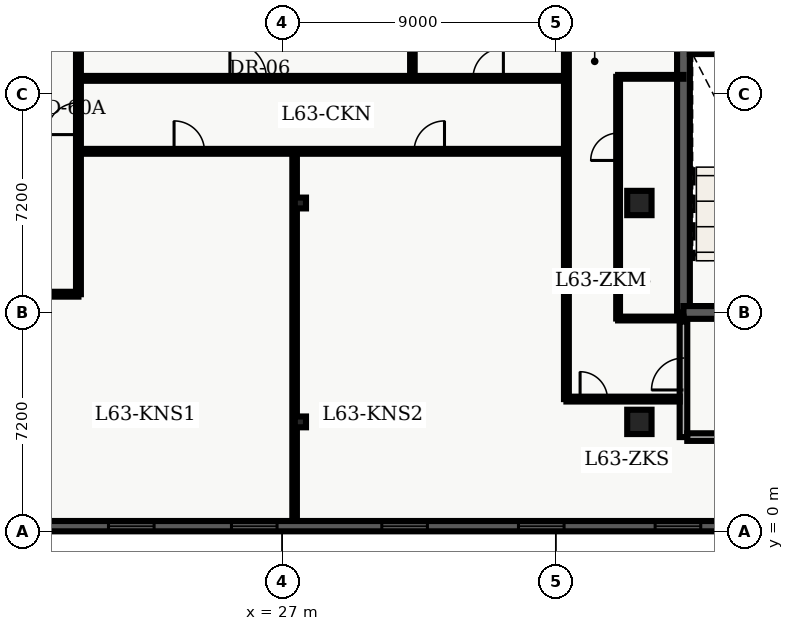
"""IFC4 building model, lengths in metres.
Left out: names, types, materials, properties, quantities, classifications, styles, units other than length and angle.
Written with IfcOpenShell. Run it as: python <this file> out.ifc"""

import sys

from ifc_helpers import new_model, entity, si_unit, converted_unit, direction, frame, origin_with_axes, origin_2d_with_axis, place, context, subcontext, project, spatial, polyline, rectangle, i_section, outline, extrude, element, fill, save


model = new_model("IFC4")
c1 = context("Model", 3, precision=1e-05, world=origin_with_axes(), true_north=direction((0.0, 1.0)))
c2 = subcontext(c1, "Body", "Model", "MODEL_VIEW")
j1 = project(units=[si_unit("LENGTHUNIT", "METRE"), converted_unit("PLANEANGLEUNIT", "DEGREE", entity("IfcPlaneAngleMeasure", 0.017), si_unit("PLANEANGLEUNIT", "RADIAN"), dimensions=[0, 0, 0, 0, 0, 0, 0])], contexts=[c1])
p1 = place(None, origin_with_axes())
s1 = spatial("IfcSite", under=j1, at=p1, CompositionType="ELEMENT")
p2 = place(p1, origin_with_axes())
s2 = spatial("IfcBuilding", under=s1, at=p2, CompositionType="ELEMENT")
p3 = place(p2, frame((0.0, 0.0, 256.8), z_axis=(0.0, 0.0, 1.0), x_axis=(1.0, 0.0, 0.0)))
s3 = spatial("IfcBuildingStorey", under=s2, at=p3, CompositionType="ELEMENT", Elevation=256.8)
p4 = place(p3, frame((40.2, 7.2, 0.0), z_axis=(0.0, 0.0, 1.0), x_axis=(0.0, 1.0, 0.0)))
e1 = element("IfcWall", 1, at=p4, inside=s3, PredefinedType="SHEAR", context=c2, shape_type="SweptSolid", body=[
    extrude(outline(polyline([(0.0, -0.21), (15.6, -0.21), (15.6, 0.21), (0.0, 0.21), (0.0, -0.21)])), origin_with_axes(), (0.0, 0.0, 1.0), 3.66),
])
p5 = place(p4, frame((12.75, 0.0, 0.0), z_axis=(0.0, 0.0, 1.0), x_axis=(1.0, 0.0, 0.0)))
e2 = element("IfcOpeningElement", 2, at=p5, cuts=e1, PredefinedType="OPENING", context=c2, shape_type="SweptSolid", body=[
    extrude(rectangle(XDim=1.2, YDim=0.44, at=origin_2d_with_axis()), origin_with_axes(), (0.0, 0.0, 1.0), 2.15),
])
p6 = place(p4, frame((9.3, 0.0, 0.0), z_axis=(0.0, 0.0, 1.0), x_axis=(1.0, 0.0, 0.0)))
e3 = element("IfcOpeningElement", 3, at=p6, cuts=e1, PredefinedType="OPENING", context=c2, shape_type="SweptSolid", body=[
    extrude(rectangle(XDim=0.9, YDim=0.44, at=origin_2d_with_axis()), origin_with_axes(), (0.0, 0.0, 1.0), 2.15),
])
p7 = place(p3, frame((40.2, 7.2, 0.0), z_axis=(0.0, 0.0, 1.0), x_axis=(1.0, 0.0, 0.0)))
e4 = element("IfcWall", 4, at=p7, inside=s3, PredefinedType="SHEAR", context=c2, shape_type="SweptSolid", body=[
    extrude(outline(polyline([(0.0, -0.21), (7.85, -0.21), (7.85, 0.21), (0.0, 0.21), (0.0, -0.21)])), origin_with_axes(), (0.0, 0.0, 1.0), 3.66),
])
p8 = place(p7, frame((2.175, 0.0, 0.0), z_axis=(0.0, 0.0, 1.0), x_axis=(1.0, 0.0, 0.0)))
e5 = element("IfcOpeningElement", 5, at=p8, cuts=e4, PredefinedType="OPENING", context=c2, shape_type="SweptSolid", body=[
    extrude(rectangle(XDim=1.05, YDim=0.44, at=origin_2d_with_axis()), origin_with_axes(), (0.0, 0.0, 1.0), 2.15),
])
p9 = place(p3, frame((40.41, 15.825, 0.0), z_axis=(0.0, 0.0, 1.0), x_axis=(1.0, 0.0, 0.0)))
e6 = element("IfcWall", 6, at=p9, inside=s3, PredefinedType="SHEAR", context=c2, shape_type="SweptSolid", body=[
    extrude(outline(polyline([(0.0, -0.125), (3.59, -0.125), (3.59, 0.125), (0.0, 0.125), (0.0, -0.125)])), origin_with_axes(), (0.0, 0.0, 1.0), 3.66),
])
p10 = place(p3, frame((40.2, 3.1, 0.0), z_axis=(0.0, 0.0, 1.0), x_axis=(0.0, 1.0, 0.0)))
e7 = element("IfcWall", 7, at=p10, inside=s3, PredefinedType="SOLIDWALL", context=c2, shape_type="SweptSolid", body=[
    extrude(outline(polyline([(0.0, -0.125), (3.8, -0.125), (3.8, 0.125), (0.0, 0.125), (0.0, -0.125)])), origin_with_axes(), (0.0, 0.0, 1.0), 2.7),
])
p11 = place(p10, frame((2.075, 0.0, 0.0), z_axis=(0.0, 0.0, 1.0), x_axis=(1.0, 0.0, 0.0)))
e8 = element("IfcOpeningElement", 8, at=p11, cuts=e7, PredefinedType="OPENING", context=c2, shape_type="SweptSolid", body=[
    extrude(rectangle(XDim=1.05, YDim=0.27, at=origin_2d_with_axis()), origin_with_axes(), (0.0, 0.0, 1.0), 2.15),
])
p12 = place(p3, frame((40.325, 3.1, 0.0), z_axis=(0.0, 0.0, 1.0), x_axis=(1.0, 0.0, 0.0)))
e9 = element("IfcWall", 9, at=p12, inside=s3, PredefinedType="SOLIDWALL", context=c2, shape_type="SweptSolid", body=[
    extrude(outline(polyline([(0.0, -0.125), (3.95, -0.125), (3.95, 0.125), (0.0, 0.125), (0.0, -0.125)])), origin_with_axes(), (0.0, 0.0, 1.0), 2.7),
])
for number, where, z_axis, x_axis in (
    (10, (27.6, 3.6, 0.0), (0.0, 0.0, 1.0), (1.0, 0.0, 0.0)),
    (11, (27.6, 10.8, 0.0), (0.0, 0.0, 1.0), (1.0, 0.0, 0.0)),
):
    element("IfcColumn", number, at=place(p3, frame(where, z_axis=z_axis, x_axis=x_axis)), inside=s3, PredefinedType="COLUMN", context=c2, shape_type="SweptSolid", body=[
        extrude(i_section(OverallWidth=0.369, OverallDepth=0.356, WebThickness=0.011, FlangeThickness=0.018, FilletRadius=0.018, at=origin_2d_with_axis()), origin_with_axes(), (0.0, 0.0, 1.0), 3.9),
    ])
for number, where, z_axis, x_axis in (
    (12, (38.75, 3.6, 0.0), (0.0, 0.0, 1.0), (1.0, 0.0, 0.0)),
    (13, (38.75, 10.8, 0.0), (0.0, 0.0, 1.0), (1.0, 0.0, 0.0)),
):
    element("IfcColumn", number, at=place(p3, frame(where, z_axis=z_axis, x_axis=x_axis)), inside=s3, PredefinedType="COLUMN", context=c2, shape_type="SweptSolid", body=[
        extrude(rectangle(XDim=0.8, YDim=0.8, at=origin_2d_with_axis()), origin_with_axes(), (0.0, 0.0, 1.0), 3.9),
    ])
p13 = place(p3, frame((8.135, 7.8, 0.0), z_axis=(0.0, 0.0, 1.0), x_axis=(1.0, 0.0, 0.0)))
e14 = element("IfcWall", 14, at=p13, inside=s3, PredefinedType="PARTITIONING", context=c2, shape_type="SweptSolid", body=[
    extrude(outline(polyline([(0.0, -0.08), (12.165, -0.08), (12.165, 0.08), (0.0, 0.08), (0.0, -0.08)])), origin_with_axes(), (0.0, 0.0, 1.0), 2.7),
])
p14 = place(p13, frame((3.967, 0.0, 0.0), z_axis=(0.0, 0.0, 1.0), x_axis=(1.0, 0.0, 0.0)))
e15 = element("IfcOpeningElement", 15, at=p14, cuts=e14, PredefinedType="OPENING", context=c2, shape_type="SweptSolid", body=[
    extrude(rectangle(XDim=1.0, YDim=0.18, at=origin_2d_with_axis()), origin_with_axes(), (0.0, 0.0, 1.0), 2.15),
])
p15 = place(p13, frame((8.767, 0.0, 0.0), z_axis=(0.0, 0.0, 1.0), x_axis=(1.0, 0.0, 0.0)))
e16 = element("IfcOpeningElement", 16, at=p15, cuts=e14, PredefinedType="OPENING", context=c2, shape_type="SweptSolid", body=[
    extrude(rectangle(XDim=1.0, YDim=0.18, at=origin_2d_with_axis()), origin_with_axes(), (0.0, 0.0, 1.0), 2.15),
])
p16 = place(p3, frame((20.3, 7.8, 0.0), z_axis=(0.0, 0.0, 1.0), x_axis=(0.0, 1.0, 0.0)))
e17 = element("IfcWall", 17, at=p16, inside=s3, PredefinedType="PARTITIONING", context=c2, shape_type="SweptSolid", body=[
    extrude(outline(polyline([(0.0, -0.08), (32.7, -0.08), (32.7, 0.08), (0.0, 0.08), (0.0, -0.08)])), origin_with_axes(), (0.0, 0.0, 1.0), 2.7),
])
p17 = place(p16, frame((17.665, 0.0, 0.0), z_axis=(0.0, 0.0, 1.0), x_axis=(1.0, 0.0, 0.0)))
e18 = element("IfcOpeningElement", 18, at=p17, cuts=e17, PredefinedType="OPENING", context=c2, shape_type="SweptSolid", body=[
    extrude(rectangle(XDim=1.0, YDim=0.18, at=origin_2d_with_axis()), origin_with_axes(), (0.0, 0.0, 1.0), 2.15),
])
p18 = place(p16, frame((27.185, 0.0, 0.0), z_axis=(0.0, 0.0, 1.0), x_axis=(1.0, 0.0, 0.0)))
e19 = element("IfcOpeningElement", 19, at=p18, cuts=e17, PredefinedType="OPENING", context=c2, shape_type="SweptSolid", body=[
    extrude(rectangle(XDim=1.0, YDim=0.18, at=origin_2d_with_axis()), origin_with_axes(), (0.0, 0.0, 1.0), 2.15),
])
p19 = place(p16, frame((5.775, 0.0, 0.0), z_axis=(0.0, 0.0, 1.0), x_axis=(1.0, 0.0, 0.0)))
e20 = element("IfcOpeningElement", 20, at=p19, cuts=e17, PredefinedType="OPENING", context=c2, shape_type="SweptSolid", body=[
    extrude(rectangle(XDim=1.05, YDim=0.18, at=origin_2d_with_axis()), origin_with_axes(), (0.0, 0.0, 1.0), 2.15),
])
p20 = place(p3, frame((20.3, 12.5, 0.0), z_axis=(0.0, 0.0, 1.0), x_axis=(1.0, 0.0, 0.0)))
e21 = element("IfcWall", 21, at=p20, inside=s3, PredefinedType="PARTITIONING", context=c2, shape_type="SweptSolid", body=[
    extrude(outline(polyline([(0.0, -0.08), (16.05, -0.08), (16.05, 0.08), (0.0, 0.08), (0.0, -0.08)])), origin_with_axes(), (0.0, 0.0, 1.0), 2.7),
])
p21 = place(p20, frame((3.645, 0.0, 0.0), z_axis=(0.0, 0.0, 1.0), x_axis=(1.0, 0.0, 0.0)))
e22 = element("IfcOpeningElement", 22, at=p21, cuts=e21, PredefinedType="OPENING", context=c2, shape_type="SweptSolid", body=[
    extrude(rectangle(XDim=1.0, YDim=0.18, at=origin_2d_with_axis()), origin_with_axes(), (0.0, 0.0, 1.0), 2.15),
])
p22 = place(p20, frame((11.54, 0.0, 0.0), z_axis=(0.0, 0.0, 1.0), x_axis=(1.0, 0.0, 0.0)))
e23 = element("IfcOpeningElement", 23, at=p22, cuts=e21, PredefinedType="OPENING", context=c2, shape_type="SweptSolid", body=[
    extrude(rectangle(XDim=1.0, YDim=0.18, at=origin_2d_with_axis()), origin_with_axes(), (0.0, 0.0, 1.0), 2.15),
])
p23 = place(p3, frame((20.3, 14.9, 0.0), z_axis=(0.0, 0.0, 1.0), x_axis=(1.0, 0.0, 0.0)))
e24 = element("IfcWall", 24, at=p23, inside=s3, PredefinedType="PARTITIONING", context=c2, shape_type="SweptSolid", body=[
    extrude(outline(polyline([(0.0, -0.08), (16.05, -0.08), (16.05, 0.08), (0.0, 0.08), (0.0, -0.08)])), origin_with_axes(), (0.0, 0.0, 1.0), 2.7),
])
p24 = place(p23, frame((5.582, 0.0, 0.0), z_axis=(0.0, 0.0, 1.0), x_axis=(1.0, 0.0, 0.0)))
e25 = element("IfcOpeningElement", 25, at=p24, cuts=e24, PredefinedType="OPENING", context=c2, shape_type="SweptSolid", body=[
    extrude(rectangle(XDim=1.2, YDim=0.18, at=origin_2d_with_axis()), origin_with_axes(), (0.0, 0.0, 1.0), 2.2),
])
p25 = place(p23, frame((13.477, 0.0, 0.0), z_axis=(0.0, 0.0, 1.0), x_axis=(1.0, 0.0, 0.0)))
e26 = element("IfcOpeningElement", 26, at=p25, cuts=e24, PredefinedType="OPENING", context=c2, shape_type="SweptSolid", body=[
    extrude(rectangle(XDim=1.0, YDim=0.18, at=origin_2d_with_axis()), origin_with_axes(), (0.0, 0.0, 1.0), 2.15),
])
p26 = place(p3, frame((36.35, 4.35, 0.0), z_axis=(0.0, 0.0, 1.0), x_axis=(0.0, 1.0, 0.0)))
e27 = element("IfcWall", 27, at=p26, inside=s3, PredefinedType="PARTITIONING", context=c2, shape_type="SweptSolid", body=[
    extrude(outline(polyline([(0.0, -0.08), (16.95, -0.08), (16.95, 0.08), (0.0, 0.08), (0.0, -0.08)])), origin_with_axes(), (0.0, 0.0, 1.0), 2.7),
])
p27 = place(p3, frame((27.41, 0.335, 0.0), z_axis=(0.0, 0.0, 1.0), x_axis=(0.0, 1.0, 0.0)))
e28 = element("IfcWall", 28, at=p27, inside=s3, PredefinedType="PARTITIONING", context=c2, shape_type="SweptSolid", body=[
    extrude(outline(polyline([(0.0, -0.075), (12.045, -0.075), (12.045, 0.075), (0.0, 0.075), (0.0, -0.075)])), origin_with_axes(), (0.0, 0.0, 1.0), 2.7),
])
p28 = place(p3, frame((31.284, 15.02, 0.0), z_axis=(0.0, 0.0, 1.0), x_axis=(0.0, 1.0, 0.0)))
e29 = element("IfcWall", 29, at=p28, inside=s3, PredefinedType="PARTITIONING", context=c2, shape_type="SweptSolid", body=[
    extrude(outline(polyline([(0.0, -0.075), (6.2, -0.075), (6.2, 0.075), (0.0, 0.075), (0.0, -0.075)])), origin_with_axes(), (0.0, 0.0, 1.0), 2.7),
])
p29 = place(p3, frame((36.35, 4.35, 0.0), z_axis=(0.0, 0.0, 1.0), x_axis=(1.0, 0.0, 0.0)))
e30 = element("IfcWall", 30, at=p29, inside=s3, PredefinedType="PARTITIONING", context=c2, shape_type="SweptSolid", body=[
    extrude(outline(polyline([(0.0, -0.08), (3.725, -0.08), (3.725, 0.08), (0.0, 0.08), (0.0, -0.08)])), origin_with_axes(), (0.0, 0.0, 1.0), 2.7),
])
p30 = place(p29, frame((0.9, 0.0, 0.0), z_axis=(0.0, 0.0, 1.0), x_axis=(1.0, 0.0, 0.0)))
e31 = element("IfcOpeningElement", 31, at=p30, cuts=e30, PredefinedType="OPENING", context=c2, shape_type="SweptSolid", body=[
    extrude(rectangle(XDim=0.9, YDim=0.18, at=origin_2d_with_axis()), origin_with_axes(), (0.0, 0.0, 1.0), 2.15),
])
for number, where, z_axis, x_axis in (
    (32, (38.05, 7.0, 0.0), (0.0, 0.0, 1.0), (1.0, 0.0, 0.0)),
    (33, (38.05, 14.95, 0.0), (0.0, 0.0, 1.0), (1.0, 0.0, 0.0)),
):
    element("IfcWall", number, at=place(p3, frame(where, z_axis=z_axis, x_axis=x_axis)), inside=s3, PredefinedType="PARTITIONING", context=c2, shape_type="SweptSolid", body=[
        extrude(outline(polyline([(0.0, -0.062), (2.15, -0.062), (2.15, 0.062), (0.0, 0.062), (0.0, -0.062)])), origin_with_axes(), (0.0, 0.0, 1.0), 2.7),
    ])
p31 = place(p3, frame((38.05, 7.0, 0.0), z_axis=(0.0, 0.0, 1.0), x_axis=(0.0, 1.0, 0.0)))
e34 = element("IfcWall", 34, at=p31, inside=s3, PredefinedType="PARTITIONING", context=c2, shape_type="SweptSolid", body=[
    extrude(outline(polyline([(0.0, -0.062), (7.95, -0.062), (7.95, 0.062), (0.0, 0.062), (0.0, -0.062)])), origin_with_axes(), (0.0, 0.0, 1.0), 2.7),
])
p32 = place(p31, frame((5.65, 0.0, 0.0), z_axis=(0.0, 0.0, 1.0), x_axis=(1.0, 0.0, 0.0)))
e35 = element("IfcOpeningElement", 35, at=p32, cuts=e34, PredefinedType="OPENING", context=c2, shape_type="SweptSolid", body=[
    extrude(rectangle(XDim=0.9, YDim=0.145, at=origin_2d_with_axis()), origin_with_axes(), (0.0, 0.0, 1.0), 2.15),
])
p33 = place(p3, frame((47.36, 0.17, 0.0), z_axis=(0.0, 0.0, 1.0), x_axis=(-1.0, 0.0, 0.0)))
e36 = element("IfcWall", 36, at=p33, inside=s3, PredefinedType="SOLIDWALL", context=c2, shape_type="SweptSolid", body=[
    extrude(outline(polyline([(0.0, -0.17), (37.16, -0.17), (37.16, 0.17), (0.0, 0.17), (0.0, -0.17)])), origin_with_axes(), (0.0, 0.0, 1.0), 3.66),
])
p34 = place(p33, frame((2.847, 0.0, 0.45), z_axis=(0.0, 0.0, 1.0), x_axis=(1.0, 0.0, 0.0)))
e37 = element("IfcOpeningElement", 37, at=p34, cuts=e36, PredefinedType="OPENING", context=c2, shape_type="SweptSolid", body=[
    extrude(rectangle(XDim=1.5, YDim=0.36, at=origin_2d_with_axis()), origin_with_axes(), (0.0, 0.0, 1.0), 2.1),
])
p35 = place(p33, frame((7.342, 0.0, 0.45), z_axis=(0.0, 0.0, 1.0), x_axis=(1.0, 0.0, 0.0)))
e38 = element("IfcOpeningElement", 38, at=p35, cuts=e36, PredefinedType="OPENING", context=c2, shape_type="SweptSolid", body=[
    extrude(rectangle(XDim=1.5, YDim=0.36, at=origin_2d_with_axis()), origin_with_axes(), (0.0, 0.0, 1.0), 2.1),
])
p36 = place(p33, frame((11.837, 0.0, 0.45), z_axis=(0.0, 0.0, 1.0), x_axis=(1.0, 0.0, 0.0)))
e39 = element("IfcOpeningElement", 39, at=p36, cuts=e36, PredefinedType="OPENING", context=c2, shape_type="SweptSolid", body=[
    extrude(rectangle(XDim=1.5, YDim=0.36, at=origin_2d_with_axis()), origin_with_axes(), (0.0, 0.0, 1.0), 2.1),
])
p37 = place(p33, frame((16.332, 0.0, 0.45), z_axis=(0.0, 0.0, 1.0), x_axis=(1.0, 0.0, 0.0)))
e40 = element("IfcOpeningElement", 40, at=p37, cuts=e36, PredefinedType="OPENING", context=c2, shape_type="SweptSolid", body=[
    extrude(rectangle(XDim=1.5, YDim=0.36, at=origin_2d_with_axis()), origin_with_axes(), (0.0, 0.0, 1.0), 2.1),
])
p38 = place(p33, frame((21.277, 0.0, 0.45), z_axis=(0.0, 0.0, 1.0), x_axis=(1.0, 0.0, 0.0)))
e41 = element("IfcOpeningElement", 41, at=p38, cuts=e36, PredefinedType="OPENING", context=c2, shape_type="SweptSolid", body=[
    extrude(rectangle(XDim=1.5, YDim=0.36, at=origin_2d_with_axis()), origin_with_axes(), (0.0, 0.0, 1.0), 2.1),
])
p39 = place(p33, frame((25.322, 0.0, 0.45), z_axis=(0.0, 0.0, 1.0), x_axis=(1.0, 0.0, 0.0)))
e42 = element("IfcOpeningElement", 42, at=p39, cuts=e36, PredefinedType="OPENING", context=c2, shape_type="SweptSolid", body=[
    extrude(rectangle(XDim=1.5, YDim=0.36, at=origin_2d_with_axis()), origin_with_axes(), (0.0, 0.0, 1.0), 2.1),
])
p40 = place(p33, frame((29.817, 0.0, 0.45), z_axis=(0.0, 0.0, 1.0), x_axis=(1.0, 0.0, 0.0)))
e43 = element("IfcOpeningElement", 43, at=p40, cuts=e36, PredefinedType="OPENING", context=c2, shape_type="SweptSolid", body=[
    extrude(rectangle(XDim=1.5, YDim=0.36, at=origin_2d_with_axis()), origin_with_axes(), (0.0, 0.0, 1.0), 2.1),
])
p41 = place(p33, frame((34.312, 0.0, 0.45), z_axis=(0.0, 0.0, 1.0), x_axis=(1.0, 0.0, 0.0)))
e44 = element("IfcOpeningElement", 44, at=p41, cuts=e36, PredefinedType="OPENING", context=c2, shape_type="SweptSolid", body=[
    extrude(rectangle(XDim=1.5, YDim=0.36, at=origin_2d_with_axis()), origin_with_axes(), (0.0, 0.0, 1.0), 2.1),
])
p42 = place(p10, frame((2.075, 0.0, 0.0), z_axis=(0.0, 0.0, 1.0), x_axis=(1.0, 0.0, 0.0)))
e45 = element("IfcDoor", 45, at=p42, inside=s3, OperationType="SINGLE_SWING_LEFT", PredefinedType="DOOR", context=c2, shape_type="SweptSolid", body=[
    extrude(rectangle(XDim=1.05, YDim=0.09, at=origin_2d_with_axis()), origin_with_axes(), (0.0, 0.0, 1.0), 2.15),
])
fill(e8, e45)
p43 = place(p16, frame((5.775, 0.0, 0.0), z_axis=(0.0, 0.0, 1.0), x_axis=(1.0, 0.0, 0.0)))
e46 = element("IfcDoor", 46, at=p43, inside=s3, OperationType="SINGLE_SWING_LEFT", PredefinedType="DOOR", context=c2, shape_type="SweptSolid", body=[
    extrude(rectangle(XDim=1.05, YDim=0.09, at=origin_2d_with_axis()), origin_with_axes(), (0.0, 0.0, 1.0), 2.15),
])
fill(e20, e46)
p44 = place(p20, frame((3.645, 0.0, 0.0), z_axis=(0.0, 0.0, 1.0), x_axis=(1.0, 0.0, 0.0)))
e47 = element("IfcDoor", 47, at=p44, inside=s3, OperationType="SINGLE_SWING_LEFT", PredefinedType="DOOR", context=c2, shape_type="SweptSolid", body=[
    extrude(rectangle(XDim=1.0, YDim=0.09, at=origin_2d_with_axis()), origin_with_axes(), (0.0, 0.0, 1.0), 2.15),
])
fill(e22, e47)
p45 = place(p20, frame((11.54, 0.0, 0.0), z_axis=(0.0, 0.0, 1.0), x_axis=(1.0, 0.0, 0.0)))
e48 = element("IfcDoor", 48, at=p45, inside=s3, OperationType="SINGLE_SWING_RIGHT", PredefinedType="DOOR", context=c2, shape_type="SweptSolid", body=[
    extrude(rectangle(XDim=1.0, YDim=0.09, at=origin_2d_with_axis()), origin_with_axes(), (0.0, 0.0, 1.0), 2.15),
])
fill(e23, e48)
p46 = place(p23, frame((5.582, 0.0, 0.0), z_axis=(0.0, 0.0, 1.0), x_axis=(1.0, 0.0, 0.0)))
e49 = element("IfcDoor", 49, at=p46, inside=s3, OperationType="SINGLE_SWING_LEFT", PredefinedType="DOOR", context=c2, shape_type="SweptSolid", body=[
    extrude(rectangle(XDim=1.2, YDim=0.09, at=origin_2d_with_axis()), origin_with_axes(), (0.0, 0.0, 1.0), 2.2),
])
fill(e25, e49)
p47 = place(p23, frame((13.477, 0.0, 0.0), z_axis=(0.0, 0.0, 1.0), x_axis=(1.0, 0.0, 0.0)))
e50 = element("IfcDoor", 50, at=p47, inside=s3, OperationType="SINGLE_SWING_RIGHT", PredefinedType="DOOR", context=c2, shape_type="SweptSolid", body=[
    extrude(rectangle(XDim=1.0, YDim=0.09, at=origin_2d_with_axis()), origin_with_axes(), (0.0, 0.0, 1.0), 2.15),
])
fill(e26, e50)
p48 = place(p29, frame((0.9, 0.0, 0.0), z_axis=(0.0, 0.0, 1.0), x_axis=(1.0, 0.0, 0.0)))
e51 = element("IfcDoor", 51, at=p48, inside=s3, OperationType="SINGLE_SWING_LEFT", PredefinedType="DOOR", context=c2, shape_type="SweptSolid", body=[
    extrude(rectangle(XDim=0.9, YDim=0.09, at=origin_2d_with_axis()), origin_with_axes(), (0.0, 0.0, 1.0), 2.15),
])
fill(e31, e51)
p49 = place(p31, frame((5.65, 0.0, 0.0), z_axis=(0.0, 0.0, 1.0), x_axis=(1.0, 0.0, 0.0)))
e52 = element("IfcDoor", 52, at=p49, inside=s3, OperationType="SINGLE_SWING_LEFT", PredefinedType="DOOR", context=c2, shape_type="SweptSolid", body=[
    extrude(rectangle(XDim=0.9, YDim=0.075, at=origin_2d_with_axis()), origin_with_axes(), (0.0, 0.0, 1.0), 2.15),
])
fill(e35, e52)
p50 = place(p33, frame((7.342, 0.0, 0.45), z_axis=(0.0, 0.0, 1.0), x_axis=(1.0, 0.0, 0.0)))
e53 = element("IfcWindow", 53, at=p50, inside=s3, PredefinedType="WINDOW", context=c2, shape_type="SweptSolid", body=[
    extrude(rectangle(XDim=1.5, YDim=0.09, at=origin_2d_with_axis()), origin_with_axes(), (0.0, 0.0, 1.0), 2.1),
])
fill(e38, e53)
p51 = place(p33, frame((11.837, 0.0, 0.45), z_axis=(0.0, 0.0, 1.0), x_axis=(1.0, 0.0, 0.0)))
e54 = element("IfcWindow", 54, at=p51, inside=s3, PredefinedType="WINDOW", context=c2, shape_type="SweptSolid", body=[
    extrude(rectangle(XDim=1.5, YDim=0.09, at=origin_2d_with_axis()), origin_with_axes(), (0.0, 0.0, 1.0), 2.1),
])
fill(e39, e54)
p52 = place(p33, frame((16.332, 0.0, 0.45), z_axis=(0.0, 0.0, 1.0), x_axis=(1.0, 0.0, 0.0)))
e55 = element("IfcWindow", 55, at=p52, inside=s3, PredefinedType="WINDOW", context=c2, shape_type="SweptSolid", body=[
    extrude(rectangle(XDim=1.5, YDim=0.09, at=origin_2d_with_axis()), origin_with_axes(), (0.0, 0.0, 1.0), 2.1),
])
fill(e40, e55)
p53 = place(p33, frame((21.277, 0.0, 0.45), z_axis=(0.0, 0.0, 1.0), x_axis=(1.0, 0.0, 0.0)))
e56 = element("IfcWindow", 56, at=p53, inside=s3, PredefinedType="WINDOW", context=c2, shape_type="SweptSolid", body=[
    extrude(rectangle(XDim=1.5, YDim=0.09, at=origin_2d_with_axis()), origin_with_axes(), (0.0, 0.0, 1.0), 2.1),
])
fill(e41, e56)
p54 = place(p33, frame((25.322, 0.0, 0.45), z_axis=(0.0, 0.0, 1.0), x_axis=(1.0, 0.0, 0.0)))
e57 = element("IfcWindow", 57, at=p54, inside=s3, PredefinedType="WINDOW", context=c2, shape_type="SweptSolid", body=[
    extrude(rectangle(XDim=1.5, YDim=0.09, at=origin_2d_with_axis()), origin_with_axes(), (0.0, 0.0, 1.0), 2.1),
])
fill(e42, e57)
save(model, sys.argv[1])
